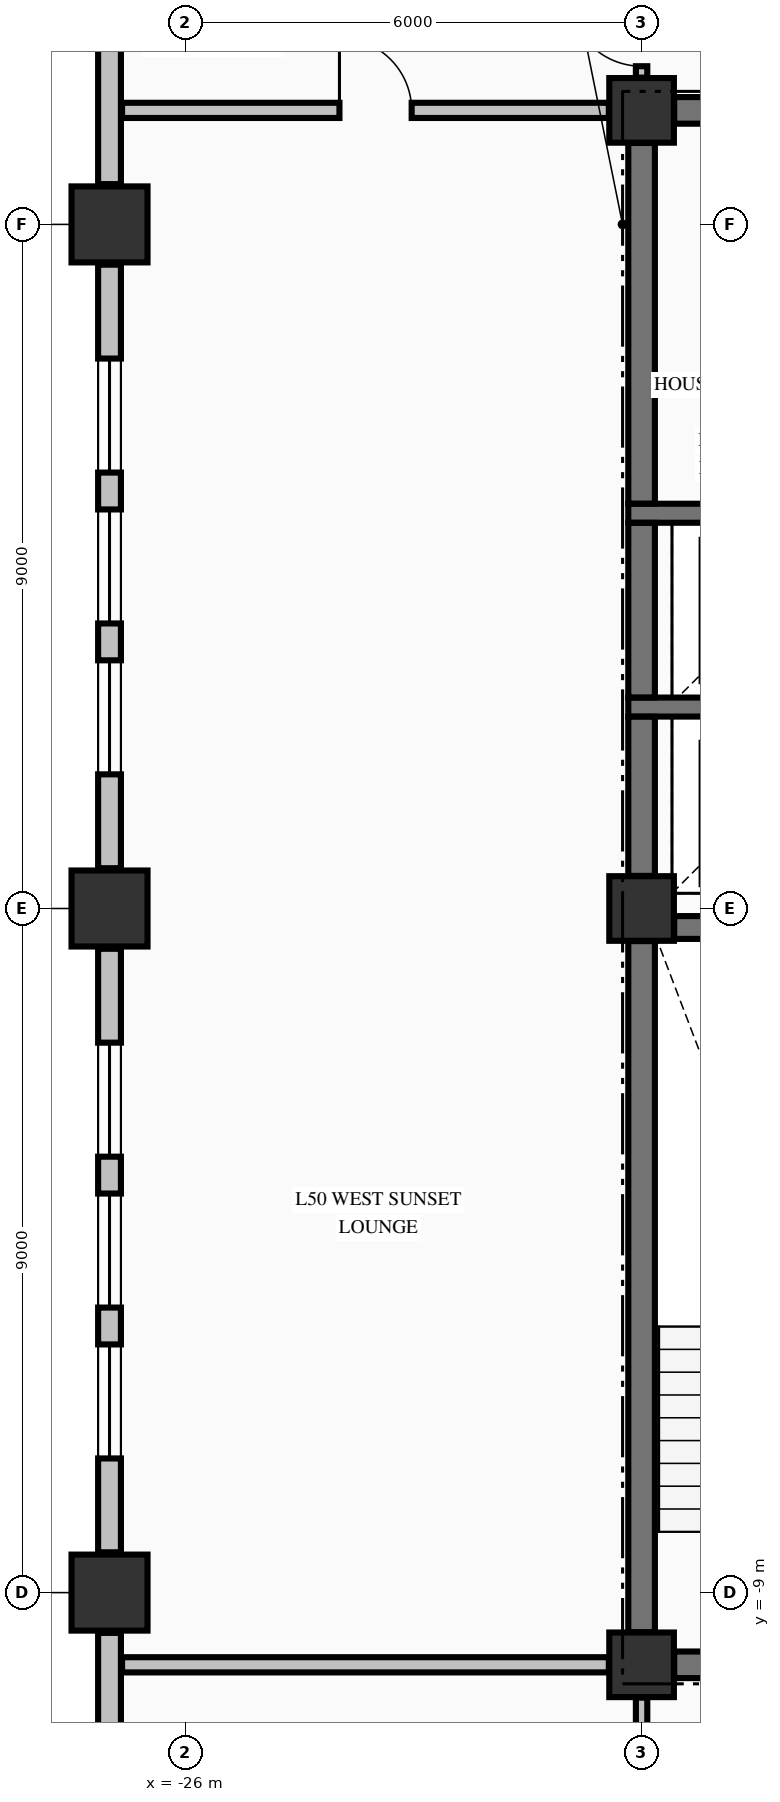
"""IFC4 building model, lengths in metres.
Left out: names, types, materials, properties, quantities, classifications, styles, units other than length and angle.
Written with IfcOpenShell. Run it as: python <this file> out.ifc"""

import sys

from ifc_helpers import new_model, si_unit, direction, frame, frame_2d, origin, origin_2d, place, context, subcontext, project, spatial, rectangle, extrude, element, fill, save


model = new_model("IFC4")
c1 = context("Model", 3, precision=1e-05, world=origin(), true_north=direction((0.0, 1.0)))
c2 = subcontext(c1, "Body", "Model", "MODEL_VIEW")
j1 = project(units=[si_unit("LENGTHUNIT", "METRE"), si_unit("PLANEANGLEUNIT", "RADIAN")], contexts=[c1])
p1 = place(None, origin())
s1 = spatial("IfcSite", under=j1, at=p1, CompositionType="ELEMENT")
p2 = place(p1, origin())
s2 = spatial("IfcBuilding", under=s1, at=p2, CompositionType="ELEMENT")
p3 = place(p2, frame((0.0, 0.0, 194.86)))
s3 = spatial("IfcBuildingStorey", under=s2, at=p3, CompositionType="ELEMENT", Elevation=194.86)
for number, where, z_axis, x_axis in (
    (1, (-27.0, -9.0, -0.275), (0.0, 0.0, 1.0), (1.0, 0.0, 0.0)),
    (2, (-27.0, 0.0, -0.275), (0.0, 0.0, 1.0), (1.0, 0.0, 0.0)),
    (3, (-27.0, 9.0, -0.275), (0.0, 0.0, 1.0), (1.0, 0.0, 0.0)),
):
    element("IfcColumn", number, at=place(p3, frame(where, z_axis=z_axis, x_axis=x_axis)), inside=s3, PredefinedType="COLUMN", context=c2, shape_type="SweptSolid", body=[
        extrude(rectangle(XDim=1.0, YDim=1.0, at=origin_2d()), origin(), (0.0, 0.0, 1.0), 3.425),
    ])
for number, where, z_axis, x_axis in (
    (4, (-20.0, -9.95, -0.275), (0.0, 0.0, 1.0), (1.0, 0.0, 0.0)),
    (5, (-20.0, 10.5, -0.275), (0.0, 0.0, 1.0), (1.0, 0.0, 0.0)),
    (6, (-20.0, 0.0, -0.275), (0.0, 0.0, 1.0), (1.0, 0.0, 0.0)),
):
    element("IfcColumn", number, at=place(p3, frame(where, z_axis=z_axis, x_axis=x_axis)), inside=s3, PredefinedType="COLUMN", context=c2, shape_type="SweptSolid", body=[
        extrude(rectangle(XDim=0.85, YDim=0.85, at=origin_2d()), origin(), (0.0, 0.0, 1.0), 3.425),
    ])
p4 = place(p3, frame((-27.0, -9.53, 0.0), z_axis=(0.0, 0.0, 1.0), x_axis=(0.0, -1.0, 0.0)))
e7 = element("IfcWall", 7, at=p4, inside=s3, PredefinedType="STANDARD", context=c2, shape_type="SweptSolid", body=[
    extrude(rectangle(XDim=9.44, YDim=0.3, at=frame_2d((4.72, 0.0))), origin(), (0.0, 0.0, 1.0), 2.542),
])
p5 = place(p3, frame((-27.0, -0.53, 0.0), z_axis=(0.0, 0.0, 1.0), x_axis=(0.0, -1.0, 0.0)))
e8 = element("IfcWall", 8, at=p5, inside=s3, PredefinedType="STANDARD", context=c2, shape_type="SweptSolid", body=[
    extrude(rectangle(XDim=7.94, YDim=0.3, at=frame_2d((3.97, 0.0))), origin(), (0.0, 0.0, 1.0), 2.542),
])
p6 = place(p5, frame((1.235, 0.0, 0.72)))
e9 = element("IfcOpeningElement", 9, at=p6, cuts=e8, PredefinedType="OPENING", context=c2, shape_type="SweptSolid", body=[
    extrude(rectangle(XDim=1.5, YDim=1.6, at=frame_2d((0.75, 0.8))), frame((0.0, 0.16, 0.0), z_axis=(0.0, -1.0, 0.0), x_axis=(1.0, 0.0, 0.0)), (0.0, 0.0, 1.0), 0.32),
])
p7 = place(p5, frame((3.22, 0.0, 0.72)))
e10 = element("IfcOpeningElement", 10, at=p7, cuts=e8, PredefinedType="OPENING", context=c2, shape_type="SweptSolid", body=[
    extrude(rectangle(XDim=1.5, YDim=1.6, at=frame_2d((0.75, 0.8))), frame((0.0, 0.16, 0.0), z_axis=(0.0, -1.0, 0.0), x_axis=(1.0, 0.0, 0.0)), (0.0, 0.0, 1.0), 0.32),
])
p8 = place(p5, frame((5.205, 0.0, 0.72)))
e11 = element("IfcOpeningElement", 11, at=p8, cuts=e8, PredefinedType="OPENING", context=c2, shape_type="SweptSolid", body=[
    extrude(rectangle(XDim=1.5, YDim=1.6, at=frame_2d((0.75, 0.8))), frame((0.0, 0.16, 0.0), z_axis=(0.0, -1.0, 0.0), x_axis=(1.0, 0.0, 0.0)), (0.0, 0.0, 1.0), 0.32),
])
p9 = place(p3, frame((-27.0, 8.47, 0.0), z_axis=(0.0, 0.0, 1.0), x_axis=(0.0, -1.0, 0.0)))
e12 = element("IfcWall", 12, at=p9, inside=s3, PredefinedType="STANDARD", context=c2, shape_type="SweptSolid", body=[
    extrude(rectangle(XDim=7.94, YDim=0.3, at=frame_2d((3.97, 0.0))), origin(), (0.0, 0.0, 1.0), 2.542),
])
p10 = place(p9, frame((1.235, 0.0, 0.72)))
e13 = element("IfcOpeningElement", 13, at=p10, cuts=e12, PredefinedType="OPENING", context=c2, shape_type="SweptSolid", body=[
    extrude(rectangle(XDim=1.5, YDim=1.6, at=frame_2d((0.75, 0.8))), frame((0.0, 0.16, 0.0), z_axis=(0.0, -1.0, 0.0), x_axis=(1.0, 0.0, 0.0)), (0.0, 0.0, 1.0), 0.32),
])
p11 = place(p9, frame((3.22, 0.0, 0.72)))
e14 = element("IfcOpeningElement", 14, at=p11, cuts=e12, PredefinedType="OPENING", context=c2, shape_type="SweptSolid", body=[
    extrude(rectangle(XDim=1.5, YDim=1.6, at=frame_2d((0.75, 0.8))), frame((0.0, 0.16, 0.0), z_axis=(0.0, -1.0, 0.0), x_axis=(1.0, 0.0, 0.0)), (0.0, 0.0, 1.0), 0.32),
])
p12 = place(p9, frame((5.205, 0.0, 0.72)))
e15 = element("IfcOpeningElement", 15, at=p12, cuts=e12, PredefinedType="OPENING", context=c2, shape_type="SweptSolid", body=[
    extrude(rectangle(XDim=1.5, YDim=1.6, at=frame_2d((0.75, 0.8))), frame((0.0, 0.16, 0.0), z_axis=(0.0, -1.0, 0.0), x_axis=(1.0, 0.0, 0.0)), (0.0, 0.0, 1.0), 0.32),
])
p13 = place(p3, frame((-27.0, 18.97, 0.0), z_axis=(0.0, 0.0, 1.0), x_axis=(0.0, -1.0, 0.0)))
e16 = element("IfcWall", 16, at=p13, inside=s3, PredefinedType="STANDARD", context=c2, shape_type="SweptSolid", body=[
    extrude(rectangle(XDim=9.44, YDim=0.3, at=frame_2d((4.72, 0.0))), origin(), (0.0, 0.0, 1.0), 2.542),
])
p14 = place(p3, frame((-19.571, -9.95, 0.0), z_axis=(0.0, 0.0, 1.0), x_axis=(1.0, 0.0, 0.0)))
e17 = element("IfcWall", 17, at=p14, inside=s3, PredefinedType="SHEAR", context=c2, shape_type="SweptSolid", body=[
    extrude(rectangle(XDim=4.871, YDim=0.35, at=frame_2d((2.436, 0.0))), origin(), (0.0, 0.0, 1.0), 3.15),
])
p15 = place(p14, frame((0.746, 0.0, 0.0)))
e18 = element("IfcOpeningElement", 18, at=p15, cuts=e17, PredefinedType="OPENING", context=c2, shape_type="SweptSolid", body=[
    extrude(rectangle(XDim=1.05, YDim=2.15, at=frame_2d((0.525, 1.075))), frame((0.0, 0.185, 0.0), z_axis=(0.0, -1.0, 0.0), x_axis=(1.0, 0.0, 0.0)), (0.0, 0.0, 1.0), 0.37),
])
p16 = place(p3, frame((-19.571, -0.25, 0.0), z_axis=(0.0, 0.0, 1.0), x_axis=(1.0, 0.0, 0.0)))
e19 = element("IfcWall", 19, at=p16, inside=s3, PredefinedType="SHEAR", context=c2, shape_type="SweptSolid", body=[
    extrude(rectangle(XDim=8.142, YDim=0.3, at=frame_2d((4.071, 0.0))), origin(), (0.0, 0.0, 1.0), 3.15),
])
p17 = place(p16, frame((5.871, 0.0, 0.0)))
e20 = element("IfcOpeningElement", 20, at=p17, cuts=e19, PredefinedType="OPENING", context=c2, shape_type="SweptSolid", body=[
    extrude(rectangle(XDim=1.1, YDim=2.15, at=frame_2d((0.55, 1.075))), frame((0.0, 0.16, 0.0), z_axis=(0.0, -1.0, 0.0), x_axis=(1.0, 0.0, 0.0)), (0.0, 0.0, 1.0), 0.32),
])
for number, where, z_axis, x_axis in (
    (21, (-20.175, 2.65, 0.0), (0.0, 0.0, 1.0), (1.0, 0.0, 0.0)),
    (22, (-20.175, 5.2, 0.0), (0.0, 0.0, 1.0), (1.0, 0.0, 0.0)),
):
    element("IfcWall", number, at=place(p3, frame(where, z_axis=z_axis, x_axis=x_axis)), inside=s3, PredefinedType="SOLIDWALL", context=c2, shape_type="SweptSolid", body=[
        extrude(rectangle(XDim=3.2, YDim=0.25, at=frame_2d((1.6, 0.0))), origin(), (0.0, 0.0, 1.0), 3.15),
    ])
p18 = place(p3, frame((-19.571, 10.5, 0.0), z_axis=(0.0, 0.0, 1.0), x_axis=(1.0, 0.0, 0.0)))
e23 = element("IfcWall", 23, at=p18, inside=s3, PredefinedType="SHEAR", context=c2, shape_type="SweptSolid", body=[
    extrude(rectangle(XDim=4.871, YDim=0.35, at=frame_2d((2.436, 0.0))), origin(), (0.0, 0.0, 1.0), 3.15),
])
p19 = place(p18, frame((3.121, 0.0, 0.0)))
e24 = element("IfcOpeningElement", 24, at=p19, cuts=e23, PredefinedType="OPENING", context=c2, shape_type="SweptSolid", body=[
    extrude(rectangle(XDim=1.1, YDim=2.15, at=frame_2d((0.55, 1.075))), frame((0.0, 0.185, 0.0), z_axis=(0.0, -1.0, 0.0), x_axis=(1.0, 0.0, 0.0)), (0.0, 0.0, 1.0), 0.37),
])
p20 = place(p3, frame((-26.835, -9.95, 0.0), z_axis=(0.0, 0.0, 1.0), x_axis=(1.0, 0.0, 0.0)))
e25 = element("IfcWall", 25, at=p20, inside=s3, PredefinedType="PARTITIONING", context=c2, shape_type="SweptSolid", body=[
    extrude(rectangle(XDim=6.404, YDim=0.2, at=frame_2d((3.202, 0.0))), origin(), (0.0, 0.0, 1.0), 3.15),
])
p21 = place(p3, frame((-26.835, 10.5, 0.0), z_axis=(0.0, 0.0, 1.0), x_axis=(1.0, 0.0, 0.0)))
e26 = element("IfcWall", 26, at=p21, inside=s3, PredefinedType="PARTITIONING", context=c2, shape_type="SweptSolid", body=[
    extrude(rectangle(XDim=6.404, YDim=0.2, at=frame_2d((3.202, 0.0))), origin(), (0.0, 0.0, 1.0), 3.15),
])
p22 = place(p21, frame((2.86, 0.0, 0.0)))
e27 = element("IfcOpeningElement", 27, at=p22, cuts=e26, PredefinedType="OPENING", context=c2, shape_type="SweptSolid", body=[
    extrude(rectangle(XDim=0.95, YDim=2.15, at=frame_2d((0.475, 1.075))), frame((0.0, 0.11, 0.0), z_axis=(0.0, -1.0, 0.0), x_axis=(1.0, 0.0, 0.0)), (0.0, 0.0, 1.0), 0.22),
])
p23 = place(p3, frame((-20.0, -9.521, 0.0), z_axis=(0.0, 0.0, 1.0), x_axis=(0.0, 1.0, 0.0)))
e28 = element("IfcWall", 28, at=p23, inside=s3, PredefinedType="SHEAR", context=c2, shape_type="SweptSolid", body=[
    extrude(rectangle(XDim=9.092, YDim=0.35, at=frame_2d((4.546, 0.0))), origin(), (0.0, 0.0, 1.0), 3.15),
])
p24 = place(p3, frame((-20.0, 0.429, 0.0), z_axis=(0.0, 0.0, 1.0), x_axis=(0.0, 1.0, 0.0)))
e29 = element("IfcWall", 29, at=p24, inside=s3, PredefinedType="SHEAR", context=c2, shape_type="SweptSolid", body=[
    extrude(rectangle(XDim=2.094, YDim=0.35, at=frame_2d((1.047, 0.0))), origin(), (0.0, 0.0, 1.0), 3.15),
])
p25 = place(p3, frame((-20.0, 2.777, 0.0), z_axis=(0.0, 0.0, 1.0), x_axis=(0.0, 1.0, 0.0)))
e30 = element("IfcWall", 30, at=p25, inside=s3, PredefinedType="SHEAR", context=c2, shape_type="SweptSolid", body=[
    extrude(rectangle(XDim=2.296, YDim=0.35, at=frame_2d((1.148, 0.0))), origin(), (0.0, 0.0, 1.0), 3.15),
])
p26 = place(p3, frame((-20.0, 5.327, 0.0), z_axis=(0.0, 0.0, 1.0), x_axis=(0.0, 1.0, 0.0)))
e31 = element("IfcWall", 31, at=p26, inside=s3, PredefinedType="SHEAR", context=c2, shape_type="SweptSolid", body=[
    extrude(rectangle(XDim=4.744, YDim=0.35, at=frame_2d((2.372, 0.0))), origin(), (0.0, 0.0, 1.0), 3.15),
])
p27 = place(p3, frame((-20.0, -12.097, 0.0), z_axis=(0.0, 0.0, 1.0), x_axis=(0.0, 1.0, 0.0)))
e32 = element("IfcWall", 32, at=p27, inside=s3, PredefinedType="PARTITIONING", context=c2, shape_type="SweptSolid", body=[
    extrude(rectangle(XDim=1.716, YDim=0.15, at=frame_2d((0.858, 0.0))), origin(), (0.0, 0.0, 1.0), 2.342),
])
p28 = place(p3, frame((-20.0, 10.931, 0.0), z_axis=(0.0, 0.0, 1.0), x_axis=(0.0, 1.0, 0.0)))
e33 = element("IfcWall", 33, at=p28, inside=s3, PredefinedType="PARTITIONING", context=c2, shape_type="SweptSolid", body=[
    extrude(rectangle(XDim=1.516, YDim=0.15, at=frame_2d((0.758, 0.0))), origin(), (0.0, 0.0, 1.0), 2.342),
])
p29 = place(p28, frame((0.15, 0.0, 0.0)))
e34 = element("IfcOpeningElement", 34, at=p29, cuts=e33, PredefinedType="OPENING", context=c2, shape_type="SweptSolid", body=[
    extrude(rectangle(XDim=0.95, YDim=2.15, at=frame_2d((0.475, 1.075))), frame((0.0, 0.085, 0.0), z_axis=(0.0, -1.0, 0.0), x_axis=(1.0, 0.0, 0.0)), (0.0, 0.0, 1.0), 0.17),
])
p30 = place(p6, origin())
e35 = element("IfcWindow", 35, at=p30, inside=s3, PartitioningType="SINGLE_PANEL", PredefinedType="WINDOW", context=c2, shape_type="SweptSolid", body=[
    extrude(rectangle(XDim=1.5, YDim=1.6, at=frame_2d((0.75, 0.8))), frame((0.0, 0.03, 0.0), z_axis=(0.0, -1.0, 0.0), x_axis=(1.0, 0.0, 0.0)), (0.0, 0.0, 1.0), 0.06),
])
fill(e9, e35)
p31 = place(p7, origin())
e36 = element("IfcWindow", 36, at=p31, inside=s3, PartitioningType="SINGLE_PANEL", PredefinedType="WINDOW", context=c2, shape_type="SweptSolid", body=[
    extrude(rectangle(XDim=1.5, YDim=1.6, at=frame_2d((0.75, 0.8))), frame((0.0, 0.03, 0.0), z_axis=(0.0, -1.0, 0.0), x_axis=(1.0, 0.0, 0.0)), (0.0, 0.0, 1.0), 0.06),
])
fill(e10, e36)
p32 = place(p8, origin())
e37 = element("IfcWindow", 37, at=p32, inside=s3, PartitioningType="SINGLE_PANEL", PredefinedType="WINDOW", context=c2, shape_type="SweptSolid", body=[
    extrude(rectangle(XDim=1.5, YDim=1.6, at=frame_2d((0.75, 0.8))), frame((0.0, 0.03, 0.0), z_axis=(0.0, -1.0, 0.0), x_axis=(1.0, 0.0, 0.0)), (0.0, 0.0, 1.0), 0.06),
])
fill(e11, e37)
p33 = place(p10, origin())
e38 = element("IfcWindow", 38, at=p33, inside=s3, PartitioningType="SINGLE_PANEL", PredefinedType="WINDOW", context=c2, shape_type="SweptSolid", body=[
    extrude(rectangle(XDim=1.5, YDim=1.6, at=frame_2d((0.75, 0.8))), frame((0.0, 0.03, 0.0), z_axis=(0.0, -1.0, 0.0), x_axis=(1.0, 0.0, 0.0)), (0.0, 0.0, 1.0), 0.06),
])
fill(e13, e38)
p34 = place(p11, origin())
e39 = element("IfcWindow", 39, at=p34, inside=s3, PartitioningType="SINGLE_PANEL", PredefinedType="WINDOW", context=c2, shape_type="SweptSolid", body=[
    extrude(rectangle(XDim=1.5, YDim=1.6, at=frame_2d((0.75, 0.8))), frame((0.0, 0.03, 0.0), z_axis=(0.0, -1.0, 0.0), x_axis=(1.0, 0.0, 0.0)), (0.0, 0.0, 1.0), 0.06),
])
fill(e14, e39)
p35 = place(p12, origin())
e40 = element("IfcWindow", 40, at=p35, inside=s3, PartitioningType="SINGLE_PANEL", PredefinedType="WINDOW", context=c2, shape_type="SweptSolid", body=[
    extrude(rectangle(XDim=1.5, YDim=1.6, at=frame_2d((0.75, 0.8))), frame((0.0, 0.03, 0.0), z_axis=(0.0, -1.0, 0.0), x_axis=(1.0, 0.0, 0.0)), (0.0, 0.0, 1.0), 0.06),
])
fill(e15, e40)
p36 = place(p29, origin())
e41 = element("IfcDoor", 41, at=p36, inside=s3, OperationType="SINGLE_SWING_RIGHT", PredefinedType="DOOR", context=c2, shape_type="SweptSolid", body=[
    extrude(rectangle(XDim=0.95, YDim=2.15, at=frame_2d((0.475, 1.075))), frame((0.0, 0.025, 0.0), z_axis=(0.0, -1.0, 0.0), x_axis=(1.0, 0.0, 0.0)), (0.0, 0.0, 1.0), 0.05),
])
fill(e34, e41)
p37 = place(p22, origin())
e42 = element("IfcDoor", 42, at=p37, inside=s3, OperationType="SINGLE_SWING_LEFT", PredefinedType="DOOR", context=c2, shape_type="SweptSolid", body=[
    extrude(rectangle(XDim=0.95, YDim=2.15, at=frame_2d((0.475, 1.075))), frame((0.0, 0.025, 0.0), z_axis=(0.0, -1.0, 0.0), x_axis=(1.0, 0.0, 0.0)), (0.0, 0.0, 1.0), 0.05),
])
fill(e27, e42)
save(model, sys.argv[1])
